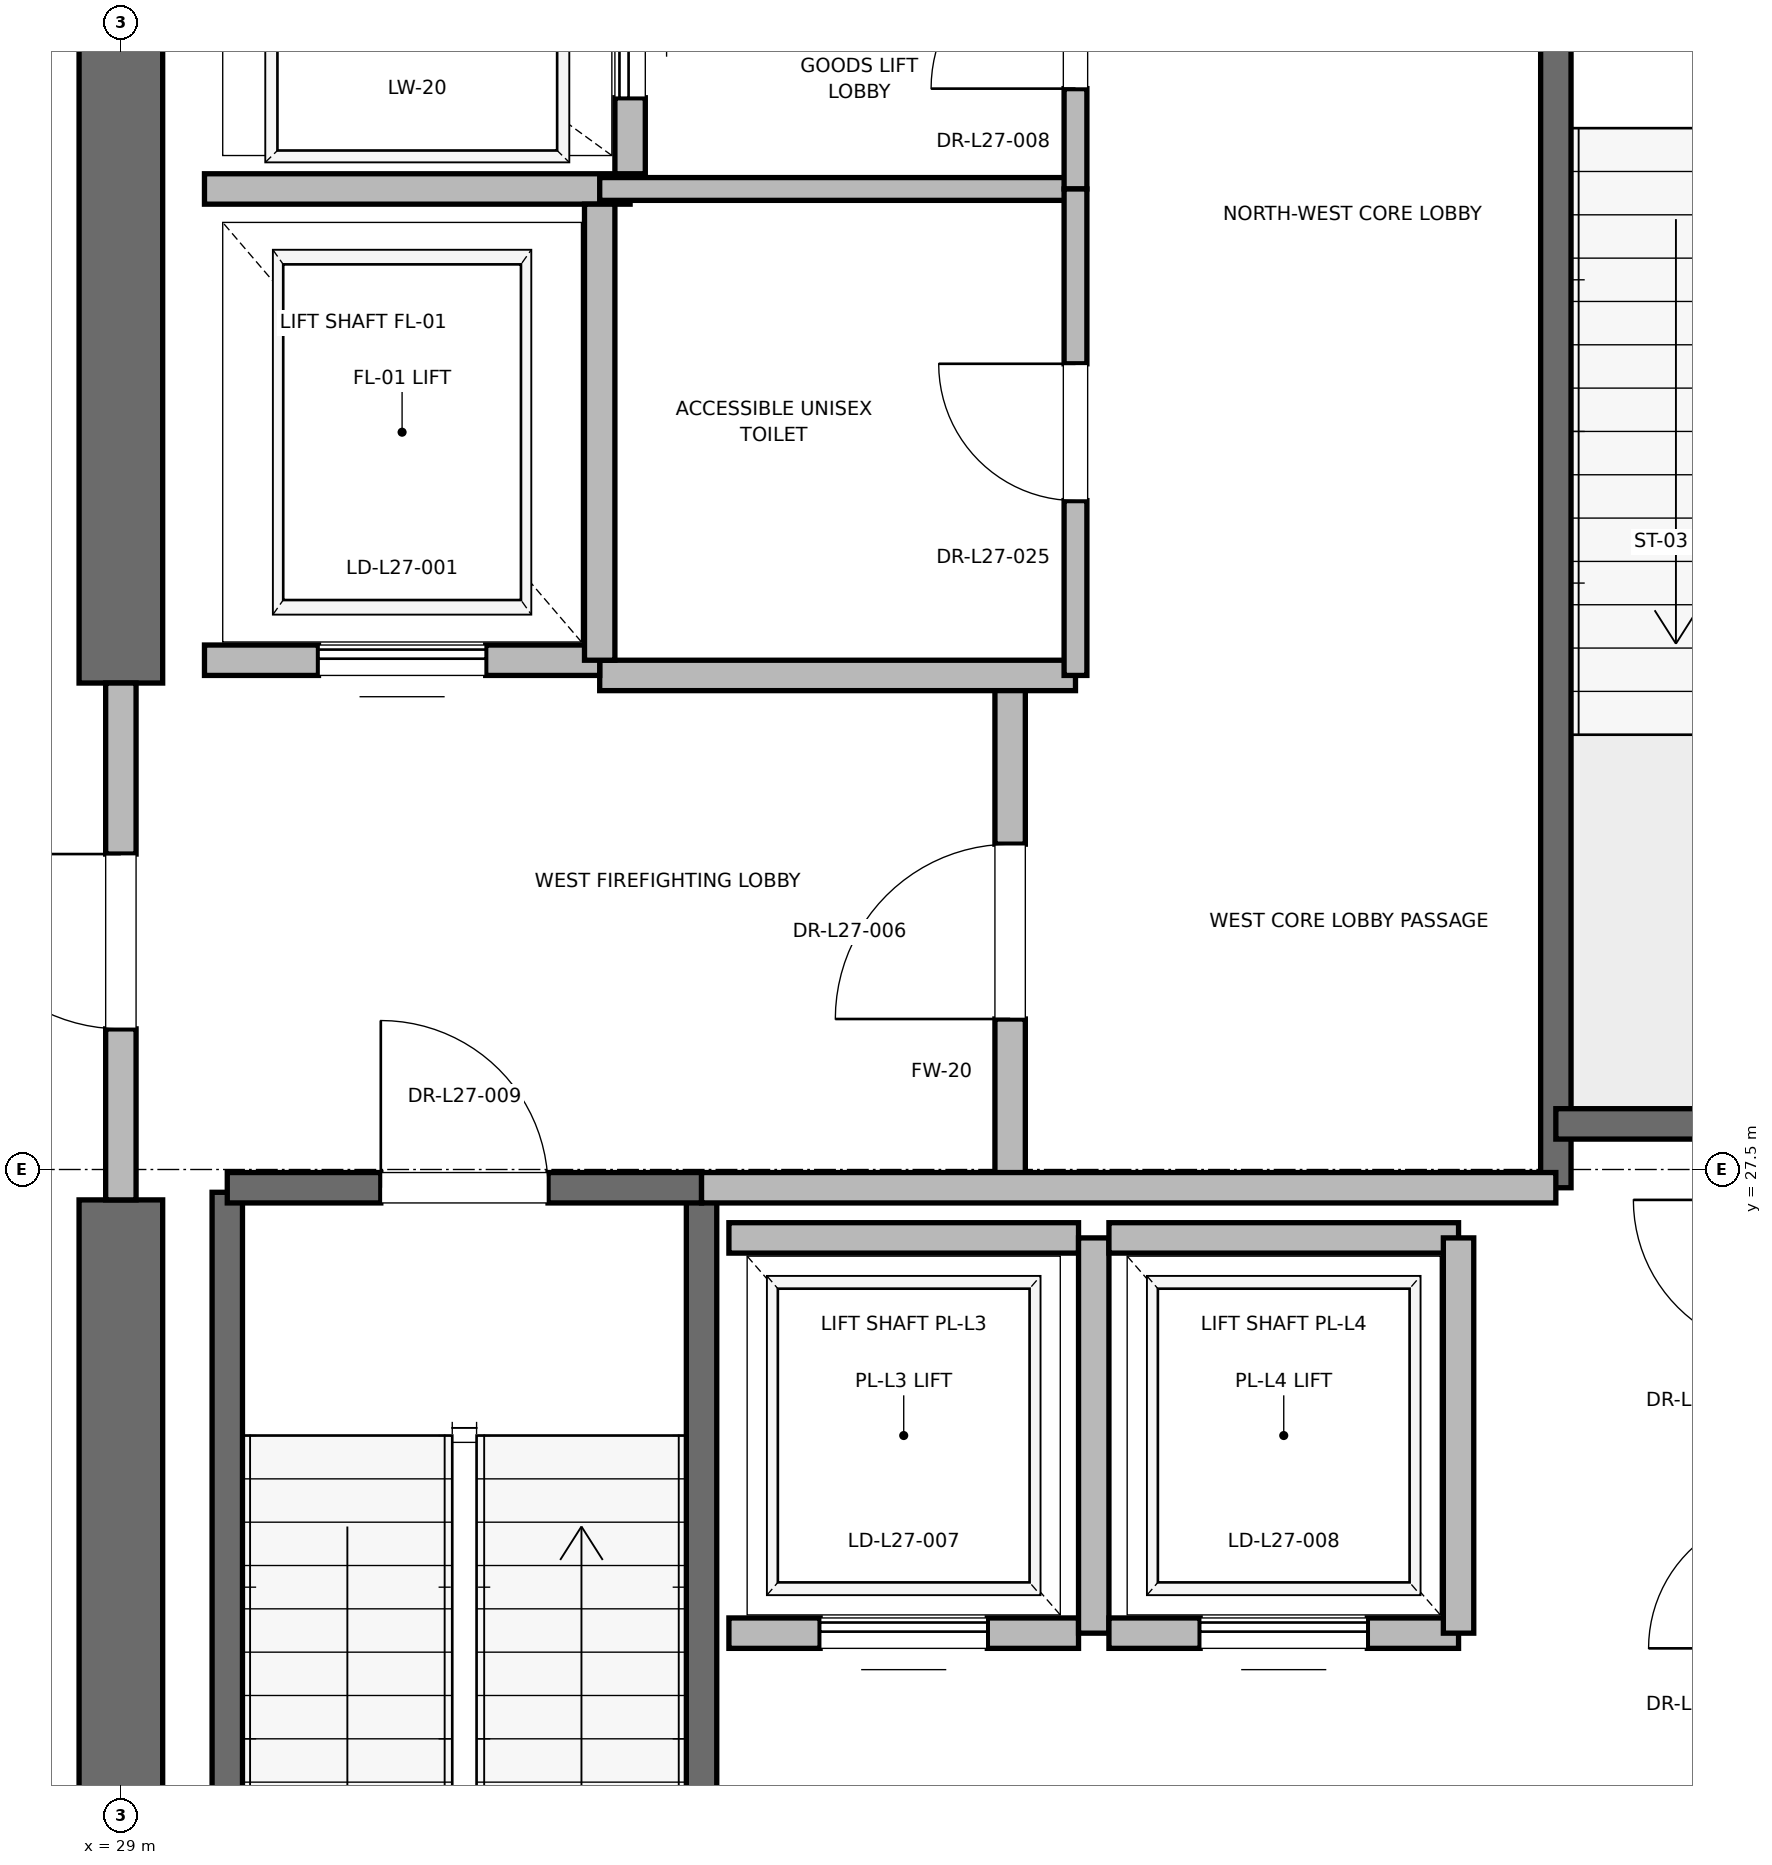
"""IFC4 building model, lengths in metres.
Left out: names, types, materials, properties, quantities, classifications, styles, units other than length and angle.
Written with IfcOpenShell. Run it as: python <this file> out.ifc"""

import sys

from ifc_helpers import new_model, si_unit, direction, frame, frame_2d, origin, place, context, subcontext, project, spatial, rectangle, extrude, element, fill, save


model = new_model("IFC4")
c1 = context("Model", 3, precision=1e-05, world=origin(), true_north=direction((0.0, 1.0)))
c2 = subcontext(c1, "Body", "Model", "MODEL_VIEW")
j1 = project(units=[si_unit("LENGTHUNIT", "METRE"), si_unit("PLANEANGLEUNIT", "RADIAN")], contexts=[c1])
p1 = place(None, origin())
s1 = spatial("IfcSite", under=j1, at=p1, CompositionType="ELEMENT")
p2 = place(p1, origin())
s2 = spatial("IfcBuilding", under=s1, at=p2, CompositionType="ELEMENT")
p3 = place(p2, frame((0.0, 0.0, 118.4)))
s3 = spatial("IfcBuildingStorey", under=s2, at=p3, CompositionType="ELEMENT", Elevation=118.4)
p4 = place(p3, frame((29.0, 18.5, 0.0), z_axis=(0.0, 0.0, 1.0), x_axis=(0.0, 1.0, 0.0)))
e1 = element("IfcWall", 1, at=p4, inside=s3, PredefinedType="SHEAR", context=c2, shape_type="SweptSolid", body=[
    extrude(rectangle(XDim=8.8, YDim=0.55, at=frame_2d((4.4, 0.0))), origin(), (0.0, 0.0, 1.0), 4.7),
])
p5 = place(p3, frame((29.0, 30.7, 0.0), z_axis=(0.0, 0.0, 1.0), x_axis=(0.0, 1.0, 0.0)))
e2 = element("IfcWall", 2, at=p5, inside=s3, PredefinedType="SHEAR", context=c2, shape_type="SweptSolid", body=[
    extrude(rectangle(XDim=5.8, YDim=0.55, at=frame_2d((2.9, 0.0))), origin(), (0.0, 0.0, 1.0), 4.7),
])
p6 = place(p3, frame((29.7, 19.2, 0.0), z_axis=(0.0, 0.0, 1.0), x_axis=(0.0, 1.0, 0.0)))
e3 = element("IfcWall", 3, at=p6, inside=s3, PredefinedType="SOLIDWALL", context=c2, shape_type="SweptSolid", body=[
    extrude(rectangle(XDim=8.15, YDim=0.2, at=frame_2d((4.075, 0.0))), origin(), (0.0, 0.0, 1.0), 4.7),
])
p7 = place(p3, frame((32.82, 18.6, 0.0), z_axis=(0.0, 0.0, 1.0), x_axis=(0.0, 1.0, 0.0)))
e4 = element("IfcWall", 4, at=p7, inside=s3, PredefinedType="SOLIDWALL", context=c2, shape_type="SweptSolid", body=[
    extrude(rectangle(XDim=8.78, YDim=0.2, at=frame_2d((4.39, 0.0))), origin(), (0.0, 0.0, 1.0), 4.7),
])
p8 = place(p3, frame((29.7, 27.38, 0.0), z_axis=(0.0, 0.0, 1.0), x_axis=(1.0, 0.0, 0.0)))
e5 = element("IfcWall", 5, at=p8, inside=s3, PredefinedType="SOLIDWALL", context=c2, shape_type="SweptSolid", body=[
    extrude(rectangle(XDim=3.12, YDim=0.2, at=frame_2d((1.56, 0.0))), origin(), (0.0, 0.0, 1.0), 4.7),
])
p9 = place(p8, frame((1.01, 0.0, 0.0)))
e6 = element("IfcOpeningElement", 6, at=p9, cuts=e5, PredefinedType="OPENING", context=c2, shape_type="SweptSolid", body=[
    extrude(rectangle(XDim=1.1, YDim=2.15, at=frame_2d((0.55, 1.075))), frame((0.0, 0.1, 0.0), z_axis=(0.0, -1.0, 0.0), x_axis=(1.0, 0.0, 0.0)), (0.0, 0.0, 1.0), 0.2),
])
p10 = place(p3, frame((38.44, 27.38, 0.0), z_axis=(0.0, 0.0, 1.0), x_axis=(0.0, 1.0, 0.0)))
e7 = element("IfcWall", 7, at=p10, inside=s3, PredefinedType="SOLIDWALL", context=c2, shape_type="SweptSolid", body=[
    extrude(rectangle(XDim=8.87, YDim=0.2, at=frame_2d((4.435, 0.0))), origin(), (0.0, 0.0, 1.0), 4.7),
])
p11 = place(p3, frame((38.44, 27.8, 0.0), z_axis=(0.0, 0.0, 1.0), x_axis=(1.0, 0.0, 0.0)))
e8 = element("IfcWall", 8, at=p11, inside=s3, PredefinedType="SOLIDWALL", context=c2, shape_type="SweptSolid", body=[
    extrude(rectangle(XDim=3.32, YDim=0.2, at=frame_2d((1.66, 0.0))), origin(), (0.0, 0.0, 1.0), 4.7),
])
p12 = place(p3, frame((34.85, 27.38, 0.0), z_axis=(0.0, 0.0, 1.0), x_axis=(0.0, 1.0, 0.0)))
e9 = element("IfcWall", 9, at=p12, inside=s3, PredefinedType="PARTITIONING", context=c2, shape_type="SweptSolid", body=[
    extrude(rectangle(XDim=3.37, YDim=0.2, at=frame_2d((1.685, 0.0))), origin(), (0.0, 0.0, 1.0), 4.7),
])
p13 = place(p12, frame((1.11, 0.0, 0.0)))
e10 = element("IfcOpeningElement", 10, at=p13, cuts=e9, PredefinedType="OPENING", context=c2, shape_type="SweptSolid", body=[
    extrude(rectangle(XDim=1.15, YDim=2.2, at=frame_2d((0.575, 1.1))), frame((0.0, 0.1, 0.0), z_axis=(0.0, -1.0, 0.0), x_axis=(1.0, 0.0, 0.0)), (0.0, 0.0, 1.0), 0.2),
])
p14 = place(p3, frame((29.0, 27.3, 0.0), z_axis=(0.0, 0.0, 1.0), x_axis=(0.0, 1.0, 0.0)))
e11 = element("IfcWall", 11, at=p14, inside=s3, PredefinedType="PARTITIONING", context=c2, shape_type="SweptSolid", body=[
    extrude(rectangle(XDim=3.4, YDim=0.2, at=frame_2d((1.7, 0.0))), origin(), (0.0, 0.0, 1.0), 3.68),
])
p15 = place(p14, frame((1.125, 0.0, 0.0)))
e12 = element("IfcOpeningElement", 12, at=p15, cuts=e11, PredefinedType="OPENING", context=c2, shape_type="SweptSolid", body=[
    extrude(rectangle(XDim=1.15, YDim=2.2, at=frame_2d((0.575, 1.1))), frame((0.0, 0.1, 0.0), z_axis=(0.0, -1.0, 0.0), x_axis=(1.0, 0.0, 0.0)), (0.0, 0.0, 1.0), 0.2),
])
p16 = place(p3, frame((32.82, 27.38, 0.0), z_axis=(0.0, 0.0, 1.0), x_axis=(1.0, 0.0, 0.0)))
e13 = element("IfcWall", 13, at=p16, inside=s3, PredefinedType="PARTITIONING", context=c2, shape_type="SweptSolid", body=[
    extrude(rectangle(XDim=5.62, YDim=0.2, at=frame_2d((2.81, 0.0))), origin(), (0.0, 0.0, 1.0), 4.7),
])
p17 = place(p3, frame((32.15, 30.75, 0.0), z_axis=(0.0, 0.0, 1.0), x_axis=(1.0, 0.0, 0.0)))
e14 = element("IfcWall", 14, at=p17, inside=s3, PredefinedType="PARTITIONING", context=c2, shape_type="SweptSolid", body=[
    extrude(rectangle(XDim=3.13, YDim=0.2, at=frame_2d((1.565, 0.0))), origin(), (0.0, 0.0, 1.0), 4.7),
])
p18 = place(p3, frame((29.55, 30.85, 0.0), z_axis=(0.0, 0.0, 1.0), x_axis=(1.0, 0.0, 0.0)))
e15 = element("IfcWall", 15, at=p18, inside=s3, PredefinedType="SOLIDWALL", context=c2, shape_type="SweptSolid", body=[
    extrude(rectangle(XDim=2.6, YDim=0.2, at=frame_2d((1.3, 0.0))), origin(), (0.0, 0.0, 1.0), 3.68),
])
p19 = place(p18, frame((0.75, 0.0, 0.0)))
e16 = element("IfcOpeningElement", 16, at=p19, cuts=e15, PredefinedType="OPENING", context=c2, shape_type="SweptSolid", body=[
    extrude(rectangle(XDim=1.1, YDim=2.2, at=frame_2d((0.55, 1.1))), frame((0.0, 0.1, 0.0), z_axis=(0.0, -1.0, 0.0), x_axis=(1.0, 0.0, 0.0)), (0.0, 0.0, 1.0), 0.2),
])
p20 = place(p3, frame((29.55, 33.95, 0.0), z_axis=(0.0, 0.0, 1.0), x_axis=(1.0, 0.0, 0.0)))
e17 = element("IfcWall", 17, at=p20, inside=s3, PredefinedType="SOLIDWALL", context=c2, shape_type="SweptSolid", body=[
    extrude(rectangle(XDim=2.8, YDim=0.2, at=frame_2d((1.4, 0.0))), origin(), (0.0, 0.0, 1.0), 4.7),
])
p21 = place(p3, frame((32.15, 30.85, 0.0), z_axis=(0.0, 0.0, 1.0), x_axis=(0.0, 1.0, 0.0)))
e18 = element("IfcWall", 18, at=p21, inside=s3, PredefinedType="SOLIDWALL", context=c2, shape_type="SweptSolid", body=[
    extrude(rectangle(XDim=3.0, YDim=0.2, at=frame_2d((1.5, 0.0))), origin(), (0.0, 0.0, 1.0), 4.7),
])
p22 = place(p3, frame((32.35, 34.05, 0.0), z_axis=(0.0, 0.0, 1.0), x_axis=(0.0, 1.0, 0.0)))
e19 = element("IfcWall", 19, at=p22, inside=s3, PredefinedType="SOLIDWALL", context=c2, shape_type="SweptSolid", body=[
    extrude(rectangle(XDim=2.1, YDim=0.2, at=frame_2d((1.05, 0.0))), origin(), (0.0, 0.0, 1.0), 4.7),
])
p23 = place(p22, frame((0.5, 0.0, 0.0)))
e20 = element("IfcOpeningElement", 20, at=p23, cuts=e19, PredefinedType="OPENING", context=c2, shape_type="SweptSolid", body=[
    extrude(rectangle(XDim=1.1, YDim=2.2, at=frame_2d((0.55, 1.1))), frame((0.0, 0.1, 0.0), z_axis=(0.0, -1.0, 0.0), x_axis=(1.0, 0.0, 0.0)), (0.0, 0.0, 1.0), 0.2),
])
p24 = place(p3, frame((33.0, 24.45, 0.0), z_axis=(0.0, 0.0, 1.0), x_axis=(1.0, 0.0, 0.0)))
e21 = element("IfcWall", 21, at=p24, inside=s3, PredefinedType="SOLIDWALL", context=c2, shape_type="SweptSolid", body=[
    extrude(rectangle(XDim=2.3, YDim=0.2, at=frame_2d((1.15, 0.0))), origin(), (0.0, 0.0, 1.0), 4.7),
])
p25 = place(p24, frame((0.6, 0.0, 0.0)))
e22 = element("IfcOpeningElement", 22, at=p25, cuts=e21, PredefinedType="OPENING", context=c2, shape_type="SweptSolid", body=[
    extrude(rectangle(XDim=1.1, YDim=2.2, at=frame_2d((0.55, 1.1))), frame((0.0, 0.1, 0.0), z_axis=(0.0, -1.0, 0.0), x_axis=(1.0, 0.0, 0.0)), (0.0, 0.0, 1.0), 0.2),
])
p26 = place(p3, frame((35.3, 27.05, 0.0), z_axis=(0.0, 0.0, 1.0), x_axis=(-1.0, 0.0, 0.0)))
e23 = element("IfcWall", 23, at=p26, inside=s3, PredefinedType="SOLIDWALL", context=c2, shape_type="SweptSolid", body=[
    extrude(rectangle(XDim=2.3, YDim=0.2, at=frame_2d((1.15, 0.0))), origin(), (0.0, 0.0, 1.0), 4.7),
])
p27 = place(p3, frame((35.4, 24.45, 0.0), z_axis=(0.0, 0.0, 1.0), x_axis=(0.0, 1.0, 0.0)))
e24 = element("IfcWall", 24, at=p27, inside=s3, PredefinedType="SOLIDWALL", context=c2, shape_type="SweptSolid", body=[
    extrude(rectangle(XDim=2.6, YDim=0.2, at=frame_2d((1.3, 0.0))), origin(), (0.0, 0.0, 1.0), 4.7),
])
p28 = place(p3, frame((35.5, 24.45, 0.0), z_axis=(0.0, 0.0, 1.0), x_axis=(1.0, 0.0, 0.0)))
e25 = element("IfcWall", 25, at=p28, inside=s3, PredefinedType="SOLIDWALL", context=c2, shape_type="SweptSolid", body=[
    extrude(rectangle(XDim=2.3, YDim=0.2, at=frame_2d((1.15, 0.0))), origin(), (0.0, 0.0, 1.0), 4.7),
])
p29 = place(p28, frame((0.6, 0.0, 0.0)))
e26 = element("IfcOpeningElement", 26, at=p29, cuts=e25, PredefinedType="OPENING", context=c2, shape_type="SweptSolid", body=[
    extrude(rectangle(XDim=1.1, YDim=2.2, at=frame_2d((0.55, 1.1))), frame((0.0, 0.1, 0.0), z_axis=(0.0, -1.0, 0.0), x_axis=(1.0, 0.0, 0.0)), (0.0, 0.0, 1.0), 0.2),
])
p30 = place(p3, frame((37.8, 27.05, 0.0), z_axis=(0.0, 0.0, 1.0), x_axis=(-1.0, 0.0, 0.0)))
e27 = element("IfcWall", 27, at=p30, inside=s3, PredefinedType="SOLIDWALL", context=c2, shape_type="SweptSolid", body=[
    extrude(rectangle(XDim=2.3, YDim=0.2, at=frame_2d((1.15, 0.0))), origin(), (0.0, 0.0, 1.0), 4.7),
])
p31 = place(p3, frame((37.8, 24.45, 0.0), z_axis=(0.0, 0.0, 1.0), x_axis=(0.0, 1.0, 0.0)))
e28 = element("IfcWall", 28, at=p31, inside=s3, PredefinedType="SOLIDWALL", context=c2, shape_type="SweptSolid", body=[
    extrude(rectangle(XDim=2.6, YDim=0.2, at=frame_2d((1.3, 0.0))), origin(), (0.0, 0.0, 1.0), 4.7),
])
p32 = place(p3, frame((32.15, 33.95, 0.0), z_axis=(0.0, 0.0, 1.0), x_axis=(1.0, 0.0, 0.0)))
e29 = element("IfcWall", 29, at=p32, inside=s3, PredefinedType="PARTITIONING", context=c2, shape_type="SweptSolid", body=[
    extrude(rectangle(XDim=3.13, YDim=0.15, at=frame_2d((1.565, 0.0))), origin(), (0.0, 0.0, 1.0), 2.85),
])
p33 = place(p3, frame((35.28, 33.95, 0.0), z_axis=(0.0, 0.0, 1.0), x_axis=(0.0, 1.0, 0.0)))
e30 = element("IfcWall", 30, at=p33, inside=s3, PredefinedType="PARTITIONING", context=c2, shape_type="SweptSolid", body=[
    extrude(rectangle(XDim=2.27, YDim=0.15, at=frame_2d((1.135, 0.0))), origin(), (0.0, 0.0, 1.0), 2.85),
])
p34 = place(p33, frame((0.66, 0.0, 0.0)))
e31 = element("IfcOpeningElement", 31, at=p34, cuts=e30, PredefinedType="OPENING", context=c2, shape_type="SweptSolid", body=[
    extrude(rectangle(XDim=0.95, YDim=2.15, at=frame_2d((0.475, 1.075))), frame((0.0, 0.075, 0.0), z_axis=(0.0, -1.0, 0.0), x_axis=(1.0, 0.0, 0.0)), (0.0, 0.0, 1.0), 0.15),
])
p35 = place(p3, frame((35.28, 30.75, 0.0), z_axis=(0.0, 0.0, 1.0), x_axis=(0.0, 1.0, 0.0)))
e32 = element("IfcWall", 32, at=p35, inside=s3, PredefinedType="PARTITIONING", context=c2, shape_type="SweptSolid", body=[
    extrude(rectangle(XDim=3.2, YDim=0.15, at=frame_2d((1.6, 0.0))), origin(), (0.0, 0.0, 1.0), 2.85),
])
p36 = place(p35, frame((1.15, 0.0, 0.0)))
e33 = element("IfcOpeningElement", 33, at=p36, cuts=e32, PredefinedType="OPENING", context=c2, shape_type="SweptSolid", body=[
    extrude(rectangle(XDim=0.9, YDim=2.1, at=frame_2d((0.45, 1.05))), frame((0.0, 0.075, 0.0), z_axis=(0.0, -1.0, 0.0), x_axis=(1.0, 0.0, 0.0)), (0.0, 0.0, 1.0), 0.15),
])
p37 = place(p9, origin())
e34 = element("IfcDoor", 34, at=p37, inside=s3, OperationType="SINGLE_SWING_LEFT", PredefinedType="DOOR", context=c2, shape_type="SweptSolid", body=[
    extrude(rectangle(XDim=1.1, YDim=2.15, at=frame_2d((0.55, 1.075))), frame((0.0, 0.025, 0.0), z_axis=(0.0, -1.0, 0.0), x_axis=(1.0, 0.0, 0.0)), (0.0, 0.0, 1.0), 0.05),
])
fill(e6, e34)
p38 = place(p13, origin())
e35 = element("IfcDoor", 35, at=p38, inside=s3, OperationType="SINGLE_SWING_LEFT", PredefinedType="DOOR", context=c2, shape_type="SweptSolid", body=[
    extrude(rectangle(XDim=1.15, YDim=2.2, at=frame_2d((0.575, 1.1))), frame((0.0, 0.025, 0.0), z_axis=(0.0, -1.0, 0.0), x_axis=(1.0, 0.0, 0.0)), (0.0, 0.0, 1.0), 0.05),
])
fill(e10, e35)
p39 = place(p15, origin())
e36 = element("IfcDoor", 36, at=p39, inside=s3, OperationType="SINGLE_SWING_RIGHT", PredefinedType="DOOR", context=c2, shape_type="SweptSolid", body=[
    extrude(rectangle(XDim=1.15, YDim=2.2, at=frame_2d((0.575, 1.1))), frame((0.0, 0.025, 0.0), z_axis=(0.0, -1.0, 0.0), x_axis=(1.0, 0.0, 0.0)), (0.0, 0.0, 1.0), 0.05),
])
fill(e12, e36)
p40 = place(p19, origin())
e37 = element("IfcDoor", 37, at=p40, inside=s3, OperationType="SLIDING_TO_RIGHT", PredefinedType="DOOR", context=c2, shape_type="SweptSolid", body=[
    extrude(rectangle(XDim=1.1, YDim=2.2, at=frame_2d((0.55, 1.1))), frame((0.0, 0.025, 0.0), z_axis=(0.0, -1.0, 0.0), x_axis=(1.0, 0.0, 0.0)), (0.0, 0.0, 1.0), 0.05),
])
fill(e16, e37)
p41 = place(p23, origin())
e38 = element("IfcDoor", 38, at=p41, inside=s3, OperationType="SLIDING_TO_RIGHT", PredefinedType="DOOR", context=c2, shape_type="SweptSolid", body=[
    extrude(rectangle(XDim=1.1, YDim=2.2, at=frame_2d((0.55, 1.1))), frame((0.0, 0.025, 0.0), z_axis=(0.0, -1.0, 0.0), x_axis=(1.0, 0.0, 0.0)), (0.0, 0.0, 1.0), 0.05),
])
fill(e20, e38)
p42 = place(p25, origin())
e39 = element("IfcDoor", 39, at=p42, inside=s3, OperationType="SLIDING_TO_RIGHT", PredefinedType="DOOR", context=c2, shape_type="SweptSolid", body=[
    extrude(rectangle(XDim=1.1, YDim=2.2, at=frame_2d((0.55, 1.1))), frame((0.0, 0.025, 0.0), z_axis=(0.0, -1.0, 0.0), x_axis=(1.0, 0.0, 0.0)), (0.0, 0.0, 1.0), 0.05),
])
fill(e22, e39)
p43 = place(p29, origin())
e40 = element("IfcDoor", 40, at=p43, inside=s3, OperationType="SLIDING_TO_RIGHT", PredefinedType="DOOR", context=c2, shape_type="SweptSolid", body=[
    extrude(rectangle(XDim=1.1, YDim=2.2, at=frame_2d((0.55, 1.1))), frame((0.0, 0.025, 0.0), z_axis=(0.0, -1.0, 0.0), x_axis=(1.0, 0.0, 0.0)), (0.0, 0.0, 1.0), 0.05),
])
fill(e26, e40)
p44 = place(p34, origin())
e41 = element("IfcDoor", 41, at=p44, inside=s3, OperationType="SINGLE_SWING_LEFT", PredefinedType="DOOR", context=c2, shape_type="SweptSolid", body=[
    extrude(rectangle(XDim=0.95, YDim=2.15, at=frame_2d((0.475, 1.075))), frame((0.0, 0.025, 0.0), z_axis=(0.0, -1.0, 0.0), x_axis=(1.0, 0.0, 0.0)), (0.0, 0.0, 1.0), 0.05),
])
fill(e31, e41)
p45 = place(p36, origin())
e42 = element("IfcDoor", 42, at=p45, inside=s3, OperationType="SINGLE_SWING_RIGHT", PredefinedType="DOOR", context=c2, shape_type="SweptSolid", body=[
    extrude(rectangle(XDim=0.9, YDim=2.1, at=frame_2d((0.45, 1.05))), frame((0.0, 0.025, 0.0), z_axis=(0.0, -1.0, 0.0), x_axis=(1.0, 0.0, 0.0)), (0.0, 0.0, 1.0), 0.05),
])
fill(e33, e42)
save(model, sys.argv[1])
